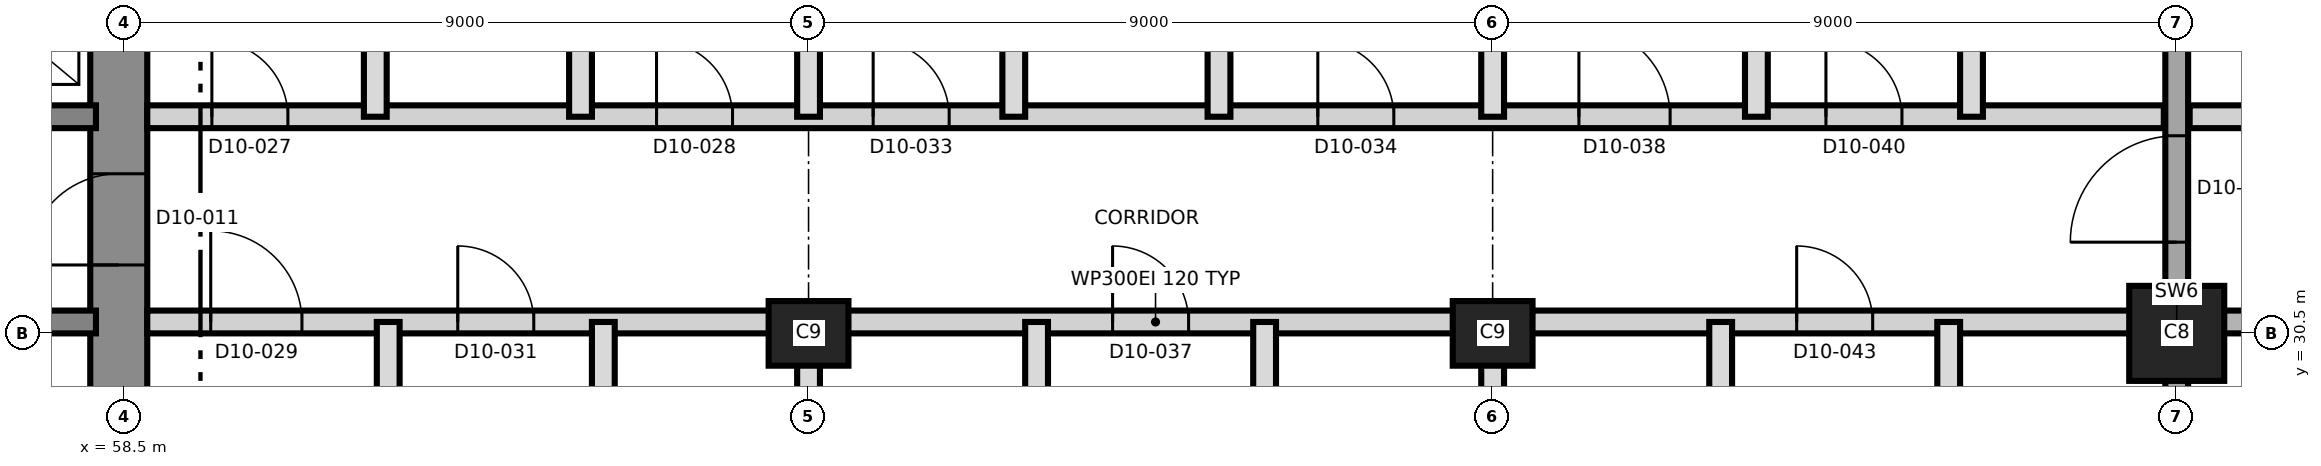
"""IFC4 building model, lengths in metres.
Left out: names, types, materials, properties, quantities, classifications, styles, units other than length and angle.
Written with IfcOpenShell. Run it as: python <this file> out.ifc"""

import sys

from ifc_helpers import new_model, si_unit, direction, frame, frame_2d, origin, origin_2d, place, context, subcontext, project, spatial, rectangle, extrude, element, fill, save


model = new_model("IFC4")
c1 = context("Model", 3, precision=1e-05, world=origin(), true_north=direction((0.0, 1.0)))
c2 = subcontext(c1, "Body", "Model", "MODEL_VIEW")
j1 = project(units=[si_unit("LENGTHUNIT", "METRE"), si_unit("PLANEANGLEUNIT", "RADIAN")], contexts=[c1])
p1 = place(None, origin())
s1 = spatial("IfcSite", under=j1, at=p1, CompositionType="ELEMENT")
p2 = place(p1, origin())
s2 = spatial("IfcBuilding", under=s1, at=p2, CompositionType="ELEMENT")
p3 = place(p2, frame((0.0, 0.0, 116.7)))
s3 = spatial("IfcBuildingStorey", under=s2, at=p3, CompositionType="ELEMENT", Elevation=116.7)
p4 = place(p3, frame((58.425, 21.125, 0.0), z_axis=(0.0, 0.0, 1.0), x_axis=(0.0, 1.0, 0.0)))
e1 = element("IfcWall", 1, at=p4, inside=s3, PredefinedType="SHEAR", context=c2, shape_type="SweptSolid", body=[
    extrude(rectangle(XDim=18.75, YDim=0.75, at=frame_2d((9.375, 0.0))), origin(), (0.0, 0.0, 1.0), 3.7),
])
p5 = place(p4, frame((10.275, 0.0, 0.0)))
e2 = element("IfcOpeningElement", 2, at=p5, cuts=e1, PredefinedType="OPENING", context=c2, shape_type="SweptSolid", body=[
    extrude(rectangle(XDim=1.2, YDim=2.1, at=frame_2d((0.6, 1.05))), frame((0.0, 0.385, 0.0), z_axis=(0.0, -1.0, 0.0), x_axis=(1.0, 0.0, 0.0)), (0.0, 0.0, 1.0), 0.77),
])
p6 = place(p3, frame((31.875, 30.65, 0.0), z_axis=(0.0, 0.0, 1.0), x_axis=(1.0, 0.0, 0.0)))
e3 = element("IfcWall", 3, at=p6, inside=s3, PredefinedType="SHEAR", context=c2, shape_type="SweptSolid", body=[
    extrude(rectangle(XDim=26.25, YDim=0.3, at=frame_2d((13.125, 0.0))), origin(), (0.0, 0.0, 1.0), 3.7),
])
p7 = place(p6, frame((24.625, 0.0, 0.0)))
e4 = element("IfcOpeningElement", 4, at=p7, cuts=e3, PredefinedType="OPENING", context=c2, shape_type="SweptSolid", body=[
    extrude(rectangle(XDim=1.0, YDim=2.1, at=frame_2d((0.5, 1.05))), frame((0.0, 0.16, 0.0), z_axis=(0.0, -1.0, 0.0), x_axis=(1.0, 0.0, 0.0)), (0.0, 0.0, 1.0), 0.32),
])
p8 = place(p6, frame((11.425, 0.0, 0.0)))
e5 = element("IfcOpeningElement", 5, at=p8, cuts=e3, PredefinedType="OPENING", context=c2, shape_type="SweptSolid", body=[
    extrude(rectangle(XDim=1.0, YDim=2.1, at=frame_2d((0.5, 1.05))), frame((0.0, 0.16, 0.0), z_axis=(0.0, -1.0, 0.0), x_axis=(1.0, 0.0, 0.0)), (0.0, 0.0, 1.0), 0.32),
])
p9 = place(p3, frame((31.875, 33.35, 0.0), z_axis=(0.0, 0.0, 1.0), x_axis=(1.0, 0.0, 0.0)))
e6 = element("IfcWall", 6, at=p9, inside=s3, PredefinedType="SHEAR", context=c2, shape_type="SweptSolid", body=[
    extrude(rectangle(XDim=26.25, YDim=0.3, at=frame_2d((13.125, 0.0))), origin(), (0.0, 0.0, 1.0), 3.7),
])
p10 = place(p9, frame((13.775, 0.0, 0.0)))
e7 = element("IfcOpeningElement", 7, at=p10, cuts=e6, PredefinedType="OPENING", context=c2, shape_type="SweptSolid", body=[
    extrude(rectangle(XDim=1.4, YDim=2.1, at=frame_2d((0.7, 1.05))), frame((0.0, 0.16, 0.0), z_axis=(0.0, -1.0, 0.0), x_axis=(1.0, 0.0, 0.0)), (0.0, 0.0, 1.0), 0.32),
])
p11 = place(p9, frame((5.25, 0.0, 0.0)))
e8 = element("IfcOpeningElement", 8, at=p11, cuts=e6, PredefinedType="OPENING", context=c2, shape_type="SweptSolid", body=[
    extrude(rectangle(XDim=1.2, YDim=2.1, at=frame_2d((0.6, 1.05))), frame((0.0, 0.16, 0.0), z_axis=(0.0, -1.0, 0.0), x_axis=(1.0, 0.0, 0.0)), (0.0, 0.0, 1.0), 0.32),
])
p12 = place(p9, frame((19.8, 0.0, 0.0)))
e9 = element("IfcOpeningElement", 9, at=p12, cuts=e6, PredefinedType="OPENING", context=c2, shape_type="SweptSolid", body=[
    extrude(rectangle(XDim=1.2, YDim=2.1, at=frame_2d((0.6, 1.05))), frame((0.0, 0.16, 0.0), z_axis=(0.0, -1.0, 0.0), x_axis=(1.0, 0.0, 0.0)), (0.0, 0.0, 1.0), 0.32),
])
for number, where, z_axis, x_axis in (
    (10, (67.5, 30.5, 0.0), (0.0, 0.0, 1.0), (1.0, 0.0, 0.0)),
    (11, (76.5, 30.5, 0.0), (0.0, 0.0, 1.0), (1.0, 0.0, 0.0)),
):
    element("IfcColumn", number, at=place(p3, frame(where, z_axis=z_axis, x_axis=x_axis)), inside=s3, PredefinedType="COLUMN", context=c2, shape_type="SweptSolid", body=[
        extrude(rectangle(XDim=1.05, YDim=0.85, at=origin_2d()), origin(), (0.0, 0.0, 1.0), 3.7),
    ])
p13 = place(p3, frame((85.5, 30.5, 0.0), z_axis=(0.0, 0.0, 1.0), x_axis=(1.0, 0.0, 0.0)))
e12 = element("IfcColumn", 12, at=p13, inside=s3, PredefinedType="COLUMN", context=c2, shape_type="SweptSolid", body=[
    extrude(rectangle(XDim=1.25, YDim=1.25, at=origin_2d()), origin(), (0.0, 0.0, 1.0), 3.7),
])
p14 = place(p3, frame((85.5, 19.275, 0.0), z_axis=(0.0, 0.0, 1.0), x_axis=(0.0, 1.0, 0.0)))
e13 = element("IfcWall", 13, at=p14, inside=s3, PredefinedType="SHEAR", context=c2, shape_type="SweptSolid", body=[
    extrude(rectangle(XDim=22.45, YDim=0.3, at=frame_2d((11.225, 0.0))), origin(), (0.0, 0.0, 1.0), 3.7),
])
p15 = place(p14, frame((12.425, 0.0, 0.0)))
e14 = element("IfcOpeningElement", 14, at=p15, cuts=e13, PredefinedType="OPENING", context=c2, shape_type="SweptSolid", body=[
    extrude(rectangle(XDim=1.4, YDim=2.1, at=frame_2d((0.7, 1.05))), frame((0.0, 0.16, 0.0), z_axis=(0.0, -1.0, 0.0), x_axis=(1.0, 0.0, 0.0)), (0.0, 0.0, 1.0), 0.32),
])
p16 = place(p3, frame((58.8, 30.65, 0.0), z_axis=(0.0, 0.0, 1.0), x_axis=(1.0, 0.0, 0.0)))
e15 = element("IfcWall", 15, at=p16, inside=s3, PredefinedType="PARTITIONING", context=c2, shape_type="SweptSolid", body=[
    extrude(rectangle(XDim=26.53, YDim=0.3, at=frame_2d((13.265, 0.0))), origin(), (0.0, 0.0, 1.0), 3.4),
])
p17 = place(p16, frame((0.835, 0.0, 0.0)))
e16 = element("IfcOpeningElement", 16, at=p17, cuts=e15, PredefinedType="OPENING", context=c2, shape_type="SweptSolid", body=[
    extrude(rectangle(XDim=1.2, YDim=2.1, at=frame_2d((0.6, 1.05))), frame((0.0, 0.16, 0.0), z_axis=(0.0, -1.0, 0.0), x_axis=(1.0, 0.0, 0.0)), (0.0, 0.0, 1.0), 0.32),
])
p18 = place(p16, frame((4.085, 0.0, 0.0)))
e17 = element("IfcOpeningElement", 17, at=p18, cuts=e15, PredefinedType="OPENING", context=c2, shape_type="SweptSolid", body=[
    extrude(rectangle(XDim=1.0, YDim=2.1, at=frame_2d((0.5, 1.05))), frame((0.0, 0.16, 0.0), z_axis=(0.0, -1.0, 0.0), x_axis=(1.0, 0.0, 0.0)), (0.0, 0.0, 1.0), 0.32),
])
p19 = place(p16, frame((12.7, 0.0, 0.0)))
e18 = element("IfcOpeningElement", 18, at=p19, cuts=e15, PredefinedType="OPENING", context=c2, shape_type="SweptSolid", body=[
    extrude(rectangle(XDim=1.0, YDim=2.4, at=frame_2d((0.5, 1.2))), frame((0.0, 0.16, 0.0), z_axis=(0.0, -1.0, 0.0), x_axis=(1.0, 0.0, 0.0)), (0.0, 0.0, 1.0), 0.32),
])
p20 = place(p16, frame((21.7, 0.0, 0.0)))
e19 = element("IfcOpeningElement", 19, at=p20, cuts=e15, PredefinedType="OPENING", context=c2, shape_type="SweptSolid", body=[
    extrude(rectangle(XDim=1.0, YDim=2.4, at=frame_2d((0.5, 1.2))), frame((0.0, 0.16, 0.0), z_axis=(0.0, -1.0, 0.0), x_axis=(1.0, 0.0, 0.0)), (0.0, 0.0, 1.0), 0.32),
])
p21 = place(p3, frame((85.67, 30.65, 0.0), z_axis=(0.0, 0.0, 1.0), x_axis=(1.0, 0.0, 0.0)))
e20 = element("IfcWall", 20, at=p21, inside=s3, PredefinedType="SHEAR", context=c2, shape_type="SweptSolid", body=[
    extrude(rectangle(XDim=9.58, YDim=0.3, at=frame_2d((4.79, 0.0))), origin(), (0.0, 0.0, 1.0), 3.4),
])
p22 = place(p21, frame((2.08, 0.0, 0.0)))
e21 = element("IfcOpeningElement", 21, at=p22, cuts=e20, PredefinedType="OPENING", context=c2, shape_type="SweptSolid", body=[
    extrude(rectangle(XDim=1.2, YDim=2.1, at=frame_2d((0.6, 1.05))), frame((0.0, 0.16, 0.0), z_axis=(0.0, -1.0, 0.0), x_axis=(1.0, 0.0, 0.0)), (0.0, 0.0, 1.0), 0.32),
])
p23 = place(p21, frame((5.63, 0.0, 0.0)))
e22 = element("IfcOpeningElement", 22, at=p23, cuts=e20, PredefinedType="OPENING", context=c2, shape_type="SweptSolid", body=[
    extrude(rectangle(XDim=1.0, YDim=2.1, at=frame_2d((0.5, 1.05))), frame((0.0, 0.16, 0.0), z_axis=(0.0, -1.0, 0.0), x_axis=(1.0, 0.0, 0.0)), (0.0, 0.0, 1.0), 0.32),
])
p24 = place(p3, frame((58.8, 33.35, 0.0), z_axis=(0.0, 0.0, 1.0), x_axis=(1.0, 0.0, 0.0)))
e23 = element("IfcWall", 23, at=p24, inside=s3, PredefinedType="PARTITIONING", context=c2, shape_type="SweptSolid", body=[
    extrude(rectangle(XDim=26.53, YDim=0.3, at=frame_2d((13.265, 0.0))), origin(), (0.0, 0.0, 1.0), 3.4),
])
p25 = place(p24, frame((0.85, 0.0, 0.0)))
e24 = element("IfcOpeningElement", 24, at=p25, cuts=e23, PredefinedType="OPENING", context=c2, shape_type="SweptSolid", body=[
    extrude(rectangle(XDim=1.0, YDim=2.1, at=frame_2d((0.5, 1.05))), frame((0.0, 0.16, 0.0), z_axis=(0.0, -1.0, 0.0), x_axis=(1.0, 0.0, 0.0)), (0.0, 0.0, 1.0), 0.32),
])
p26 = place(p24, frame((6.7, 0.0, 0.0)))
e25 = element("IfcOpeningElement", 25, at=p26, cuts=e23, PredefinedType="OPENING", context=c2, shape_type="SweptSolid", body=[
    extrude(rectangle(XDim=1.0, YDim=2.1, at=frame_2d((0.5, 1.05))), frame((0.0, 0.16, 0.0), z_axis=(0.0, -1.0, 0.0), x_axis=(1.0, 0.0, 0.0)), (0.0, 0.0, 1.0), 0.32),
])
p27 = place(p24, frame((9.55, 0.0, 0.0)))
e26 = element("IfcOpeningElement", 26, at=p27, cuts=e23, PredefinedType="OPENING", context=c2, shape_type="SweptSolid", body=[
    extrude(rectangle(XDim=1.0, YDim=2.1, at=frame_2d((0.5, 1.05))), frame((0.0, 0.16, 0.0), z_axis=(0.0, -1.0, 0.0), x_axis=(1.0, 0.0, 0.0)), (0.0, 0.0, 1.0), 0.32),
])
p28 = place(p24, frame((15.4, 0.0, 0.0)))
e27 = element("IfcOpeningElement", 27, at=p28, cuts=e23, PredefinedType="OPENING", context=c2, shape_type="SweptSolid", body=[
    extrude(rectangle(XDim=1.0, YDim=2.1, at=frame_2d((0.5, 1.05))), frame((0.0, 0.16, 0.0), z_axis=(0.0, -1.0, 0.0), x_axis=(1.0, 0.0, 0.0)), (0.0, 0.0, 1.0), 0.32),
])
p29 = place(p24, frame((18.835, 0.0, 0.0)))
e28 = element("IfcOpeningElement", 28, at=p29, cuts=e23, PredefinedType="OPENING", context=c2, shape_type="SweptSolid", body=[
    extrude(rectangle(XDim=1.2, YDim=2.1, at=frame_2d((0.6, 1.05))), frame((0.0, 0.16, 0.0), z_axis=(0.0, -1.0, 0.0), x_axis=(1.0, 0.0, 0.0)), (0.0, 0.0, 1.0), 0.32),
])
p30 = place(p24, frame((22.085, 0.0, 0.0)))
e29 = element("IfcOpeningElement", 29, at=p30, cuts=e23, PredefinedType="OPENING", context=c2, shape_type="SweptSolid", body=[
    extrude(rectangle(XDim=1.0, YDim=2.1, at=frame_2d((0.5, 1.05))), frame((0.0, 0.16, 0.0), z_axis=(0.0, -1.0, 0.0), x_axis=(1.0, 0.0, 0.0)), (0.0, 0.0, 1.0), 0.32),
])
p31 = place(p3, frame((85.67, 33.35, 0.0), z_axis=(0.0, 0.0, 1.0), x_axis=(1.0, 0.0, 0.0)))
e30 = element("IfcWall", 30, at=p31, inside=s3, PredefinedType="PARTITIONING", context=c2, shape_type="SweptSolid", body=[
    extrude(rectangle(XDim=9.58, YDim=0.3, at=frame_2d((4.79, 0.0))), origin(), (0.0, 0.0, 1.0), 3.4),
])
p32 = place(p31, frame((1.83, 0.0, 0.0)))
e31 = element("IfcOpeningElement", 31, at=p32, cuts=e30, PredefinedType="OPENING", context=c2, shape_type="SweptSolid", body=[
    extrude(rectangle(XDim=1.0, YDim=2.1, at=frame_2d((0.5, 1.05))), frame((0.0, 0.16, 0.0), z_axis=(0.0, -1.0, 0.0), x_axis=(1.0, 0.0, 0.0)), (0.0, 0.0, 1.0), 0.32),
])
p33 = place(p31, frame((5.63, 0.0, 0.0)))
e32 = element("IfcOpeningElement", 32, at=p33, cuts=e30, PredefinedType="OPENING", context=c2, shape_type="SweptSolid", body=[
    extrude(rectangle(XDim=1.0, YDim=2.1, at=frame_2d((0.5, 1.05))), frame((0.0, 0.16, 0.0), z_axis=(0.0, -1.0, 0.0), x_axis=(1.0, 0.0, 0.0)), (0.0, 0.0, 1.0), 0.32),
])
p34 = place(p3, frame((61.8, 33.35, 0.0), z_axis=(0.0, 0.0, 1.0), x_axis=(0.0, 1.0, 0.0)))
e33 = element("IfcWall", 33, at=p34, inside=s3, PredefinedType="PARTITIONING", context=c2, shape_type="SweptSolid", body=[
    extrude(rectangle(XDim=3.2, YDim=0.3, at=frame_2d((1.6, 0.0))), origin(), (0.0, 0.0, 1.0), 3.4),
])
p35 = place(p3, frame((61.97, 19.275, 0.0), z_axis=(0.0, 0.0, 1.0), x_axis=(0.0, 1.0, 0.0)))
e34 = element("IfcWall", 34, at=p35, inside=s3, PredefinedType="PARTITIONING", context=c2, shape_type="SweptSolid", body=[
    extrude(rectangle(XDim=11.375, YDim=0.3, at=frame_2d((5.688, 0.0))), origin(), (0.0, 0.0, 1.0), 3.4),
])
p36 = place(p3, frame((64.5, 33.35, 0.0), z_axis=(0.0, 0.0, 1.0), x_axis=(0.0, 1.0, 0.0)))
e35 = element("IfcWall", 35, at=p36, inside=s3, PredefinedType="PARTITIONING", context=c2, shape_type="SweptSolid", body=[
    extrude(rectangle(XDim=8.555, YDim=0.3, at=frame_2d((4.277, 0.0))), origin(), (0.0, 0.0, 1.0), 3.4),
])
p37 = place(p3, frame((64.8, 27.45, 0.0), z_axis=(0.0, 0.0, 1.0), x_axis=(0.0, 1.0, 0.0)))
e36 = element("IfcWall", 36, at=p37, inside=s3, PredefinedType="PARTITIONING", context=c2, shape_type="SweptSolid", body=[
    extrude(rectangle(XDim=3.2, YDim=0.3, at=frame_2d((1.6, 0.0))), origin(), (0.0, 0.0, 1.0), 3.4),
])
p38 = place(p3, frame((67.5, 19.275, 0.0), z_axis=(0.0, 0.0, 1.0), x_axis=(0.0, 1.0, 0.0)))
e37 = element("IfcWall", 37, at=p38, inside=s3, PredefinedType="PARTITIONING", context=c2, shape_type="SweptSolid", body=[
    extrude(rectangle(XDim=11.375, YDim=0.3, at=frame_2d((5.688, 0.0))), origin(), (0.0, 0.0, 1.0), 3.4),
])
p39 = place(p3, frame((67.5, 33.35, 0.0), z_axis=(0.0, 0.0, 1.0), x_axis=(0.0, 1.0, 0.0)))
e38 = element("IfcWall", 38, at=p39, inside=s3, PredefinedType="PARTITIONING", context=c2, shape_type="SweptSolid", body=[
    extrude(rectangle(XDim=8.555, YDim=0.3, at=frame_2d((4.277, 0.0))), origin(), (0.0, 0.0, 1.0), 3.4),
])
p40 = place(p3, frame((70.2, 33.35, 0.0), z_axis=(0.0, 0.0, 1.0), x_axis=(0.0, 1.0, 0.0)))
e39 = element("IfcWall", 39, at=p40, inside=s3, PredefinedType="PARTITIONING", context=c2, shape_type="SweptSolid", body=[
    extrude(rectangle(XDim=3.2, YDim=0.3, at=frame_2d((1.6, 0.0))), origin(), (0.0, 0.0, 1.0), 3.4),
])
p41 = place(p3, frame((70.5, 27.35, 0.0), z_axis=(0.0, 0.0, 1.0), x_axis=(0.0, 1.0, 0.0)))
e40 = element("IfcWall", 40, at=p41, inside=s3, PredefinedType="PARTITIONING", context=c2, shape_type="SweptSolid", body=[
    extrude(rectangle(XDim=3.3, YDim=0.3, at=frame_2d((1.65, 0.0))), origin(), (0.0, 0.0, 1.0), 3.4),
])
p42 = place(p3, frame((72.9, 33.35, 0.0), z_axis=(0.0, 0.0, 1.0), x_axis=(0.0, 1.0, 0.0)))
e41 = element("IfcWall", 41, at=p42, inside=s3, PredefinedType="PARTITIONING", context=c2, shape_type="SweptSolid", body=[
    extrude(rectangle(XDim=8.555, YDim=0.3, at=frame_2d((4.277, 0.0))), origin(), (0.0, 0.0, 1.0), 3.4),
])
p43 = place(p3, frame((73.5, 27.35, 0.0), z_axis=(0.0, 0.0, 1.0), x_axis=(0.0, 1.0, 0.0)))
e42 = element("IfcWall", 42, at=p43, inside=s3, PredefinedType="PARTITIONING", context=c2, shape_type="SweptSolid", body=[
    extrude(rectangle(XDim=3.3, YDim=0.3, at=frame_2d((1.65, 0.0))), origin(), (0.0, 0.0, 1.0), 3.4),
])
p44 = place(p3, frame((76.5, 19.275, 0.0), z_axis=(0.0, 0.0, 1.0), x_axis=(0.0, 1.0, 0.0)))
e43 = element("IfcWall", 43, at=p44, inside=s3, PredefinedType="PARTITIONING", context=c2, shape_type="SweptSolid", body=[
    extrude(rectangle(XDim=11.375, YDim=0.3, at=frame_2d((5.688, 0.0))), origin(), (0.0, 0.0, 1.0), 3.4),
])
p45 = place(p3, frame((76.5, 33.35, 0.0), z_axis=(0.0, 0.0, 1.0), x_axis=(0.0, 1.0, 0.0)))
e44 = element("IfcWall", 44, at=p45, inside=s3, PredefinedType="PARTITIONING", context=c2, shape_type="SweptSolid", body=[
    extrude(rectangle(XDim=8.555, YDim=0.3, at=frame_2d((4.277, 0.0))), origin(), (0.0, 0.0, 1.0), 3.4),
])
p46 = place(p3, frame((79.5, 27.35, 0.0), z_axis=(0.0, 0.0, 1.0), x_axis=(0.0, 1.0, 0.0)))
e45 = element("IfcWall", 45, at=p46, inside=s3, PredefinedType="PARTITIONING", context=c2, shape_type="SweptSolid", body=[
    extrude(rectangle(XDim=3.3, YDim=0.3, at=frame_2d((1.65, 0.0))), origin(), (0.0, 0.0, 1.0), 3.4),
])
p47 = place(p3, frame((79.97, 33.35, 0.0), z_axis=(0.0, 0.0, 1.0), x_axis=(0.0, 1.0, 0.0)))
e46 = element("IfcWall", 46, at=p47, inside=s3, PredefinedType="PARTITIONING", context=c2, shape_type="SweptSolid", body=[
    extrude(rectangle(XDim=8.555, YDim=0.3, at=frame_2d((4.277, 0.0))), origin(), (0.0, 0.0, 1.0), 3.4),
])
p48 = place(p3, frame((82.5, 27.35, 0.0), z_axis=(0.0, 0.0, 1.0), x_axis=(0.0, 1.0, 0.0)))
e47 = element("IfcWall", 47, at=p48, inside=s3, PredefinedType="PARTITIONING", context=c2, shape_type="SweptSolid", body=[
    extrude(rectangle(XDim=3.3, YDim=0.3, at=frame_2d((1.65, 0.0))), origin(), (0.0, 0.0, 1.0), 3.4),
])
p49 = place(p3, frame((82.8, 33.35, 0.0), z_axis=(0.0, 0.0, 1.0), x_axis=(0.0, 1.0, 0.0)))
e48 = element("IfcWall", 48, at=p49, inside=s3, PredefinedType="PARTITIONING", context=c2, shape_type="SweptSolid", body=[
    extrude(rectangle(XDim=3.2, YDim=0.3, at=frame_2d((1.6, 0.0))), origin(), (0.0, 0.0, 1.0), 3.4),
])
p50 = place(p5, origin())
e49 = element("IfcDoor", 49, at=p50, inside=s3, OperationType="SINGLE_SWING_LEFT", PredefinedType="DOOR", context=c2, shape_type="SweptSolid", body=[
    extrude(rectangle(XDim=1.2, YDim=2.1, at=frame_2d((0.6, 1.05))), frame((0.0, 0.025, 0.0), z_axis=(0.0, -1.0, 0.0), x_axis=(1.0, 0.0, 0.0)), (0.0, 0.0, 1.0), 0.05),
])
fill(e2, e49)
p51 = place(p25, origin())
e50 = element("IfcDoor", 50, at=p51, inside=s3, OperationType="SINGLE_SWING_LEFT", PredefinedType="DOOR", context=c2, shape_type="SweptSolid", body=[
    extrude(rectangle(XDim=1.0, YDim=2.1, at=frame_2d((0.5, 1.05))), frame((0.0, 0.025, 0.0), z_axis=(0.0, -1.0, 0.0), x_axis=(1.0, 0.0, 0.0)), (0.0, 0.0, 1.0), 0.05),
])
fill(e24, e50)
p52 = place(p26, origin())
e51 = element("IfcDoor", 51, at=p52, inside=s3, OperationType="SINGLE_SWING_RIGHT", PredefinedType="DOOR", context=c2, shape_type="SweptSolid", body=[
    extrude(rectangle(XDim=1.0, YDim=2.1, at=frame_2d((0.5, 1.05))), frame((0.0, 0.025, 0.0), z_axis=(0.0, -1.0, 0.0), x_axis=(1.0, 0.0, 0.0)), (0.0, 0.0, 1.0), 0.05),
])
fill(e25, e51)
p53 = place(p17, origin())
e52 = element("IfcDoor", 52, at=p53, inside=s3, OperationType="SINGLE_SWING_LEFT", PredefinedType="DOOR", context=c2, shape_type="SweptSolid", body=[
    extrude(rectangle(XDim=1.2, YDim=2.1, at=frame_2d((0.6, 1.05))), frame((0.0, 0.025, 0.0), z_axis=(0.0, -1.0, 0.0), x_axis=(1.0, 0.0, 0.0)), (0.0, 0.0, 1.0), 0.05),
])
fill(e16, e52)
p54 = place(p18, origin())
e53 = element("IfcDoor", 53, at=p54, inside=s3, OperationType="SINGLE_SWING_LEFT", PredefinedType="DOOR", context=c2, shape_type="SweptSolid", body=[
    extrude(rectangle(XDim=1.0, YDim=2.1, at=frame_2d((0.5, 1.05))), frame((0.0, 0.025, 0.0), z_axis=(0.0, -1.0, 0.0), x_axis=(1.0, 0.0, 0.0)), (0.0, 0.0, 1.0), 0.05),
])
fill(e17, e53)
p55 = place(p27, origin())
e54 = element("IfcDoor", 54, at=p55, inside=s3, OperationType="SINGLE_SWING_LEFT", PredefinedType="DOOR", context=c2, shape_type="SweptSolid", body=[
    extrude(rectangle(XDim=1.0, YDim=2.1, at=frame_2d((0.5, 1.05))), frame((0.0, 0.025, 0.0), z_axis=(0.0, -1.0, 0.0), x_axis=(1.0, 0.0, 0.0)), (0.0, 0.0, 1.0), 0.05),
])
fill(e26, e54)
p56 = place(p28, origin())
e55 = element("IfcDoor", 55, at=p56, inside=s3, OperationType="SINGLE_SWING_RIGHT", PredefinedType="DOOR", context=c2, shape_type="SweptSolid", body=[
    extrude(rectangle(XDim=1.0, YDim=2.1, at=frame_2d((0.5, 1.05))), frame((0.0, 0.025, 0.0), z_axis=(0.0, -1.0, 0.0), x_axis=(1.0, 0.0, 0.0)), (0.0, 0.0, 1.0), 0.05),
])
fill(e27, e55)
p57 = place(p19, origin())
e56 = element("IfcDoor", 56, at=p57, inside=s3, OperationType="SINGLE_SWING_LEFT", PredefinedType="DOOR", context=c2, shape_type="SweptSolid", body=[
    extrude(rectangle(XDim=1.0, YDim=2.4, at=frame_2d((0.5, 1.2))), frame((0.0, 0.025, 0.0), z_axis=(0.0, -1.0, 0.0), x_axis=(1.0, 0.0, 0.0)), (0.0, 0.0, 1.0), 0.05),
])
fill(e18, e56)
p58 = place(p29, origin())
e57 = element("IfcDoor", 57, at=p58, inside=s3, OperationType="SINGLE_SWING_LEFT", PredefinedType="DOOR", context=c2, shape_type="SweptSolid", body=[
    extrude(rectangle(XDim=1.2, YDim=2.1, at=frame_2d((0.6, 1.05))), frame((0.0, 0.025, 0.0), z_axis=(0.0, -1.0, 0.0), x_axis=(1.0, 0.0, 0.0)), (0.0, 0.0, 1.0), 0.05),
])
fill(e28, e57)
p59 = place(p30, origin())
e58 = element("IfcDoor", 58, at=p59, inside=s3, OperationType="SINGLE_SWING_LEFT", PredefinedType="DOOR", context=c2, shape_type="SweptSolid", body=[
    extrude(rectangle(XDim=1.0, YDim=2.1, at=frame_2d((0.5, 1.05))), frame((0.0, 0.025, 0.0), z_axis=(0.0, -1.0, 0.0), x_axis=(1.0, 0.0, 0.0)), (0.0, 0.0, 1.0), 0.05),
])
fill(e29, e58)
p60 = place(p20, origin())
e59 = element("IfcDoor", 59, at=p60, inside=s3, OperationType="SINGLE_SWING_LEFT", PredefinedType="DOOR", context=c2, shape_type="SweptSolid", body=[
    extrude(rectangle(XDim=1.0, YDim=2.4, at=frame_2d((0.5, 1.2))), frame((0.0, 0.025, 0.0), z_axis=(0.0, -1.0, 0.0), x_axis=(1.0, 0.0, 0.0)), (0.0, 0.0, 1.0), 0.05),
])
fill(e19, e59)
p61 = place(p15, origin())
e60 = element("IfcDoor", 60, at=p61, inside=s3, OperationType="SINGLE_SWING_RIGHT", PredefinedType="DOOR", context=c2, shape_type="SweptSolid", body=[
    extrude(rectangle(XDim=1.4, YDim=2.1, at=frame_2d((0.7, 1.05))), frame((0.0, 0.025, 0.0), z_axis=(0.0, -1.0, 0.0), x_axis=(1.0, 0.0, 0.0)), (0.0, 0.0, 1.0), 0.05),
])
fill(e14, e60)
save(model, sys.argv[1])
